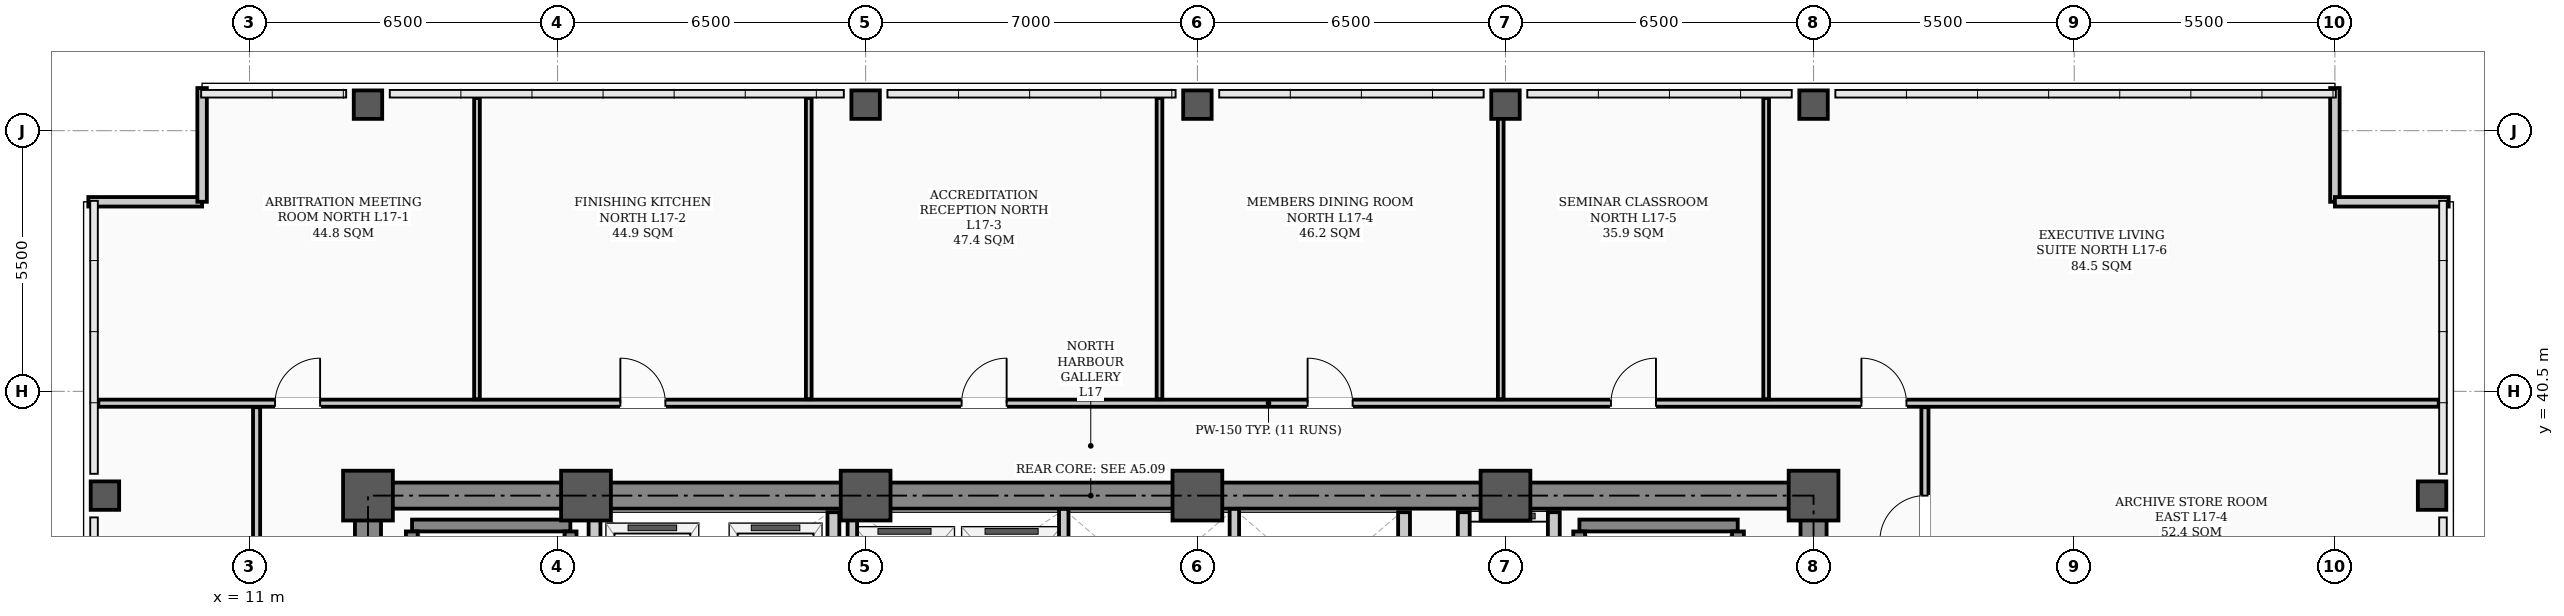
"""IFC4 building model, lengths in metres.
Left out: names, types, materials, properties, quantities, classifications, styles, units other than length and angle.
Written with IfcOpenShell. Run it as: python <this file> out.ifc"""

import sys

from ifc_helpers import new_model, si_unit, direction, frame, frame_2d, origin, origin_2d, place, context, subcontext, project, spatial, rectangle, hollow_rectangle, extrude, element, fill, save


model = new_model("IFC4")
c1 = context("Model", 3, precision=1e-05, world=origin(), true_north=direction((0.0, 1.0)))
c2 = subcontext(c1, "Body", "Model", "MODEL_VIEW")
j1 = project(units=[si_unit("LENGTHUNIT", "METRE"), si_unit("PLANEANGLEUNIT", "RADIAN")], contexts=[c1])
p1 = place(None, origin())
s1 = spatial("IfcSite", under=j1, at=p1, CompositionType="ELEMENT")
p2 = place(p1, origin())
s2 = spatial("IfcBuilding", under=s1, at=p2, CompositionType="ELEMENT")
p3 = place(p2, frame((0.0, 0.0, 69.4)))
s3 = spatial("IfcBuildingStorey", under=s2, at=p3, CompositionType="ELEMENT", Elevation=69.4)
for number, where, z_axis, x_axis in (
    (1, (13.5, 38.3, 0.0), (0.0, 0.0, 1.0), (1.0, 0.0, 0.0)),
    (2, (18.1, 38.3, 0.0), (0.0, 0.0, 1.0), (1.0, 0.0, 0.0)),
    (3, (24.0, 38.3, 0.0), (0.0, 0.0, 1.0), (1.0, 0.0, 0.0)),
    (4, (31.0, 38.3, 0.0), (0.0, 0.0, 1.0), (1.0, 0.0, 0.0)),
    (5, (37.5, 38.3, 0.0), (0.0, 0.0, 1.0), (1.0, 0.0, 0.0)),
    (6, (44.0, 38.3, 0.0), (0.0, 0.0, 1.0), (1.0, 0.0, 0.0)),
):
    element("IfcColumn", number, at=place(p3, frame(where, z_axis=z_axis, x_axis=x_axis)), inside=s3, PredefinedType="COLUMN", context=c2, shape_type="SweptSolid", body=[
        extrude(hollow_rectangle(XDim=1.05, YDim=1.05, WallThickness=0.038, InnerFilletRadius=0.019, OuterFilletRadius=0.057, at=origin_2d()), origin(), (0.0, 0.0, 1.0), 3.9),
    ])
for number, where, z_axis, x_axis in (
    (7, (7.95, 38.3, 0.0), (0.0, 0.0, 1.0), (1.0, 0.0, 0.0)),
    (8, (13.5, 46.55, 0.0), (0.0, 0.0, 1.0), (1.0, 0.0, 0.0)),
    (9, (24.0, 46.55, 0.0), (0.0, 0.0, 1.0), (1.0, 0.0, 0.0)),
    (10, (31.0, 46.55, 0.0), (0.0, 0.0, 1.0), (1.0, 0.0, 0.0)),
    (11, (37.5, 46.55, 0.0), (0.0, 0.0, 1.0), (1.0, 0.0, 0.0)),
    (12, (44.0, 46.55, 0.0), (0.0, 0.0, 1.0), (1.0, 0.0, 0.0)),
    (13, (57.05, 38.3, 0.0), (0.0, 0.0, 1.0), (1.0, 0.0, 0.0)),
):
    element("IfcColumn", number, at=place(p3, frame(where, z_axis=z_axis, x_axis=x_axis)), inside=s3, PredefinedType="COLUMN", context=c2, shape_type="SweptSolid", body=[
        extrude(hollow_rectangle(XDim=0.6, YDim=0.6, WallThickness=0.026, InnerFilletRadius=0.013, OuterFilletRadius=0.039, at=origin_2d()), origin(), (0.0, 0.0, 1.0), 3.9),
    ])
for number, where, z_axis, x_axis in (
    (14, (7.6, 44.5, 0.0), (0.0, 0.0, 1.0), (1.0, 0.0, 0.0)),
    (15, (10.0, 44.5, 0.0), (0.0, 0.0, 1.0), (0.0, 1.0, 0.0)),
    (16, (55.0, 46.9, 0.0), (0.0, 0.0, 1.0), (0.0, -1.0, 0.0)),
    (17, (55.0, 44.5, 0.0), (0.0, 0.0, 1.0), (1.0, 0.0, 0.0)),
):
    element("IfcWall", number, at=place(p3, frame(where, z_axis=z_axis, x_axis=x_axis)), inside=s3, PredefinedType="PARAPET", context=c2, shape_type="SweptSolid", body=[
        extrude(rectangle(XDim=2.4, YDim=0.2, at=frame_2d((1.2, 0.0))), origin(), (0.0, 0.0, 1.0), 1.2),
    ])
p4 = place(p3, frame((13.5, 38.3, 0.0), z_axis=(0.0, 0.0, 1.0), x_axis=(1.0, 0.0, 0.0)))
e18 = element("IfcWall", 18, at=p4, inside=s3, PredefinedType="SHEAR", context=c2, shape_type="SweptSolid", body=[
    extrude(rectangle(XDim=30.5, YDim=0.55, at=frame_2d((15.25, 0.0))), origin(), (0.0, 0.0, 1.0), 3.72),
])
for number, where, z_axis, x_axis in (
    (19, (13.5, 29.35, 0.0), (0.0, 0.0, 1.0), (0.0, 1.0, 0.0)),
    (20, (44.0, 29.35, 0.0), (0.0, 0.0, 1.0), (0.0, 1.0, 0.0)),
):
    element("IfcWall", number, at=place(p3, frame(where, z_axis=z_axis, x_axis=x_axis)), inside=s3, PredefinedType="SHEAR", context=c2, shape_type="SweptSolid", body=[
        extrude(rectangle(XDim=8.6, YDim=0.55, at=frame_2d((4.3, 0.0))), origin(), (0.0, 0.0, 1.0), 3.72),
    ])
p5 = place(p3, frame((14.43, 37.669, 0.0), z_axis=(0.0, 0.0, 1.0), x_axis=(1.0, 0.0, 0.0)))
e21 = element("IfcWall", 21, at=p5, inside=s3, PredefinedType="STANDARD", context=c2, shape_type="SweptSolid", body=[
    extrude(rectangle(XDim=3.34, YDim=0.25, at=frame_2d((1.67, 0.0))), origin(), (0.0, 0.0, 1.0), 3.72),
])
for number, where, z_axis, x_axis in (
    (22, (14.425, 30.36, 0.0), (0.0, 0.0, 1.0), (0.0, 1.0, 0.0)),
    (23, (17.775, 30.36, 0.0), (0.0, 0.0, 1.0), (0.0, 1.0, 0.0)),
):
    element("IfcWall", number, at=place(p3, frame(where, z_axis=z_axis, x_axis=x_axis)), inside=s3, PredefinedType="STANDARD", context=c2, shape_type="SweptSolid", body=[
        extrude(rectangle(XDim=7.184, YDim=0.25, at=frame_2d((3.592, 0.0))), origin(), (0.0, 0.0, 1.0), 3.72),
    ])
p6 = place(p3, frame((39.06, 37.669, 0.0), z_axis=(0.0, 0.0, 1.0), x_axis=(1.0, 0.0, 0.0)))
e24 = element("IfcWall", 24, at=p6, inside=s3, PredefinedType="STANDARD", context=c2, shape_type="SweptSolid", body=[
    extrude(rectangle(XDim=3.34, YDim=0.25, at=frame_2d((1.67, 0.0))), origin(), (0.0, 0.0, 1.0), 3.72),
])
for number, where, z_axis, x_axis in (
    (25, (39.055, 30.36, 0.0), (0.0, 0.0, 1.0), (0.0, 1.0, 0.0)),
    (26, (42.405, 30.36, 0.0), (0.0, 0.0, 1.0), (0.0, 1.0, 0.0)),
):
    element("IfcWall", number, at=place(p3, frame(where, z_axis=z_axis, x_axis=x_axis)), inside=s3, PredefinedType="STANDARD", context=c2, shape_type="SweptSolid", body=[
        extrude(rectangle(XDim=7.184, YDim=0.25, at=frame_2d((3.592, 0.0))), origin(), (0.0, 0.0, 1.0), 3.72),
    ])
p7 = place(p3, frame((36.62, 31.95, 0.0), z_axis=(0.0, 0.0, 1.0), x_axis=(0.0, 1.0, 0.0)))
e27 = element("IfcWall", 27, at=p7, inside=s3, PredefinedType="STANDARD", context=c2, shape_type="SweptSolid", body=[
    extrude(rectangle(XDim=6.0, YDim=0.25, at=frame_2d((3.0, 0.0))), origin(), (0.0, 0.0, 1.0), 3.3),
])
p8 = place(p7, frame((0.9, 0.0, 0.0)))
e28 = element("IfcOpeningElement", 28, at=p8, cuts=e27, PredefinedType="OPENING", context=c2, shape_type="SweptSolid", body=[
    extrude(rectangle(XDim=1.1, YDim=2.08, at=frame_2d((0.55, 1.04))), frame((0.0, 0.135, 0.0), z_axis=(0.0, -1.0, 0.0), x_axis=(1.0, 0.0, 0.0)), (0.0, 0.0, 1.0), 0.27),
])
p9 = place(p7, frame((4.0, 0.0, 0.0)))
e29 = element("IfcOpeningElement", 29, at=p9, cuts=e27, PredefinedType="OPENING", context=c2, shape_type="SweptSolid", body=[
    extrude(rectangle(XDim=1.1, YDim=2.08, at=frame_2d((0.55, 1.04))), frame((0.0, 0.135, 0.0), z_axis=(0.0, -1.0, 0.0), x_axis=(1.0, 0.0, 0.0)), (0.0, 0.0, 1.0), 0.27),
])
p10 = place(p3, frame((38.52, 31.95, 0.0), z_axis=(0.0, 0.0, 1.0), x_axis=(0.0, 1.0, 0.0)))
e30 = element("IfcWall", 30, at=p10, inside=s3, PredefinedType="STANDARD", context=c2, shape_type="SweptSolid", body=[
    extrude(rectangle(XDim=6.0, YDim=0.25, at=frame_2d((3.0, 0.0))), origin(), (0.0, 0.0, 1.0), 3.3),
])
for number, where, z_axis, x_axis in (
    (31, (18.28, 34.62, 0.0), (0.0, 0.0, 1.0), (0.0, 1.0, 0.0)),
    (32, (23.32, 34.62, 0.0), (0.0, 0.0, 1.0), (0.0, 1.0, 0.0)),
):
    element("IfcWall", number, at=place(p3, frame(where, z_axis=z_axis, x_axis=x_axis)), inside=s3, PredefinedType="STANDARD", context=c2, shape_type="SweptSolid", body=[
        extrude(rectangle(XDim=3.33, YDim=0.25, at=frame_2d((1.665, 0.0))), origin(), (0.0, 0.0, 1.0), 3.3),
    ])
p11 = place(p3, frame((35.36, 34.9, 0.0), z_axis=(0.0, 0.0, 1.0), x_axis=(0.0, 1.0, 0.0)))
e33 = element("IfcWall", 33, at=p11, inside=s3, PredefinedType="STANDARD", context=c2, shape_type="SweptSolid", body=[
    extrude(rectangle(XDim=3.05, YDim=0.25, at=frame_2d((1.525, 0.0))), origin(), (0.0, 0.0, 1.0), 3.3),
])
p12 = place(p3, frame((7.81, 40.25, 0.0), z_axis=(0.0, 0.0, 1.0), x_axis=(1.0, 0.0, 0.0)))
e34 = element("IfcWall", 34, at=p12, inside=s3, PredefinedType="PARTITIONING", context=c2, shape_type="SweptSolid", body=[
    extrude(rectangle(XDim=49.38, YDim=0.15, at=frame_2d((24.69, 0.0))), origin(), (0.0, 0.0, 1.0), 3.1),
])
p13 = place(p12, frame((3.73, 0.0, 0.0)))
e35 = element("IfcOpeningElement", 35, at=p13, cuts=e34, PredefinedType="OPENING", context=c2, shape_type="SweptSolid", body=[
    extrude(rectangle(XDim=0.95, YDim=2.08, at=frame_2d((0.475, 1.04))), frame((0.0, 0.085, 0.0), z_axis=(0.0, -1.0, 0.0), x_axis=(1.0, 0.0, 0.0)), (0.0, 0.0, 1.0), 0.17),
])
p14 = place(p12, frame((11.015, 0.0, 0.0)))
e36 = element("IfcOpeningElement", 36, at=p14, cuts=e34, PredefinedType="OPENING", context=c2, shape_type="SweptSolid", body=[
    extrude(rectangle(XDim=0.95, YDim=2.08, at=frame_2d((0.475, 1.04))), frame((0.0, 0.085, 0.0), z_axis=(0.0, -1.0, 0.0), x_axis=(1.0, 0.0, 0.0)), (0.0, 0.0, 1.0), 0.17),
])
p15 = place(p12, frame((18.215, 0.0, 0.0)))
e37 = element("IfcOpeningElement", 37, at=p15, cuts=e34, PredefinedType="OPENING", context=c2, shape_type="SweptSolid", body=[
    extrude(rectangle(XDim=0.95, YDim=2.08, at=frame_2d((0.475, 1.04))), frame((0.0, 0.085, 0.0), z_axis=(0.0, -1.0, 0.0), x_axis=(1.0, 0.0, 0.0)), (0.0, 0.0, 1.0), 0.17),
])
p16 = place(p12, frame((25.515, 0.0, 0.0)))
e38 = element("IfcOpeningElement", 38, at=p16, cuts=e34, PredefinedType="OPENING", context=c2, shape_type="SweptSolid", body=[
    extrude(rectangle(XDim=0.95, YDim=2.08, at=frame_2d((0.475, 1.04))), frame((0.0, 0.085, 0.0), z_axis=(0.0, -1.0, 0.0), x_axis=(1.0, 0.0, 0.0)), (0.0, 0.0, 1.0), 0.17),
])
p17 = place(p12, frame((31.915, 0.0, 0.0)))
e39 = element("IfcOpeningElement", 39, at=p17, cuts=e34, PredefinedType="OPENING", context=c2, shape_type="SweptSolid", body=[
    extrude(rectangle(XDim=0.95, YDim=2.08, at=frame_2d((0.475, 1.04))), frame((0.0, 0.085, 0.0), z_axis=(0.0, -1.0, 0.0), x_axis=(1.0, 0.0, 0.0)), (0.0, 0.0, 1.0), 0.17),
])
p18 = place(p12, frame((37.2, 0.0, 0.0)))
e40 = element("IfcOpeningElement", 40, at=p18, cuts=e34, PredefinedType="OPENING", context=c2, shape_type="SweptSolid", body=[
    extrude(rectangle(XDim=0.95, YDim=2.08, at=frame_2d((0.475, 1.04))), frame((0.0, 0.085, 0.0), z_axis=(0.0, -1.0, 0.0), x_axis=(1.0, 0.0, 0.0)), (0.0, 0.0, 1.0), 0.17),
])
p19 = place(p3, frame((11.15, 17.635, 0.0), z_axis=(0.0, 0.0, 1.0), x_axis=(0.0, 1.0, 0.0)))
e41 = element("IfcWall", 41, at=p19, inside=s3, PredefinedType="PARTITIONING", context=c2, shape_type="SweptSolid", body=[
    extrude(rectangle(XDim=22.53, YDim=0.15, at=frame_2d((11.265, 0.0))), origin(), (0.0, 0.0, 1.0), 3.0),
])
p20 = place(p19, frame((0.64, 0.0, 0.0)))
e42 = element("IfcOpeningElement", 42, at=p20, cuts=e41, PredefinedType="OPENING", context=c2, shape_type="SweptSolid", body=[
    extrude(rectangle(XDim=0.95, YDim=2.08, at=frame_2d((0.475, 1.04))), frame((0.0, 0.085, 0.0), z_axis=(0.0, -1.0, 0.0), x_axis=(1.0, 0.0, 0.0)), (0.0, 0.0, 1.0), 0.17),
])
p21 = place(p3, frame((46.35, 17.635, 0.0), z_axis=(0.0, 0.0, 1.0), x_axis=(0.0, 1.0, 0.0)))
e43 = element("IfcWall", 43, at=p21, inside=s3, PredefinedType="PARTITIONING", context=c2, shape_type="SweptSolid", body=[
    extrude(rectangle(XDim=22.53, YDim=0.15, at=frame_2d((11.265, 0.0))), origin(), (0.0, 0.0, 1.0), 3.0),
])
p22 = place(p21, frame((3.065, 0.0, 0.0)))
e44 = element("IfcOpeningElement", 44, at=p22, cuts=e43, PredefinedType="OPENING", context=c2, shape_type="SweptSolid", body=[
    extrude(rectangle(XDim=0.95, YDim=2.08, at=frame_2d((0.475, 1.04))), frame((0.0, 0.085, 0.0), z_axis=(0.0, -1.0, 0.0), x_axis=(1.0, 0.0, 0.0)), (0.0, 0.0, 1.0), 0.17),
])
p23 = place(p21, frame((9.39, 0.0, 0.0)))
e45 = element("IfcOpeningElement", 45, at=p23, cuts=e43, PredefinedType="OPENING", context=c2, shape_type="SweptSolid", body=[
    extrude(rectangle(XDim=0.95, YDim=2.08, at=frame_2d((0.475, 1.04))), frame((0.0, 0.085, 0.0), z_axis=(0.0, -1.0, 0.0), x_axis=(1.0, 0.0, 0.0)), (0.0, 0.0, 1.0), 0.17),
])
p24 = place(p21, frame((14.69, 0.0, 0.0)))
e46 = element("IfcOpeningElement", 46, at=p24, cuts=e43, PredefinedType="OPENING", context=c2, shape_type="SweptSolid", body=[
    extrude(rectangle(XDim=0.95, YDim=2.08, at=frame_2d((0.475, 1.04))), frame((0.0, 0.085, 0.0), z_axis=(0.0, -1.0, 0.0), x_axis=(1.0, 0.0, 0.0)), (0.0, 0.0, 1.0), 0.17),
])
p25 = place(p21, frame((19.715, 0.0, 0.0)))
e47 = element("IfcOpeningElement", 47, at=p25, cuts=e43, PredefinedType="OPENING", context=c2, shape_type="SweptSolid", body=[
    extrude(rectangle(XDim=0.95, YDim=2.08, at=frame_2d((0.475, 1.04))), frame((0.0, 0.085, 0.0), z_axis=(0.0, -1.0, 0.0), x_axis=(1.0, 0.0, 0.0)), (0.0, 0.0, 1.0), 0.17),
])
for number, where, z_axis, x_axis in (
    (48, (15.8, 40.335, 0.0), (0.0, 0.0, 1.0), (0.0, 1.0, 0.0)),
    (49, (22.8, 40.335, 0.0), (0.0, 0.0, 1.0), (0.0, 1.0, 0.0)),
    (50, (30.2, 40.335, 0.0), (0.0, 0.0, 1.0), (0.0, 1.0, 0.0)),
):
    element("IfcWall", number, at=place(p3, frame(where, z_axis=z_axis, x_axis=x_axis)), inside=s3, PredefinedType="PARTITIONING", context=c2, shape_type="SweptSolid", body=[
        extrude(rectangle(XDim=6.355, YDim=0.12, at=frame_2d((3.177, 0.0))), origin(), (0.0, 0.0, 1.0), 3.212),
    ])
p26 = place(p3, frame((37.4, 40.335, 0.0), z_axis=(0.0, 0.0, 1.0), x_axis=(0.0, 1.0, 0.0)))
e51 = element("IfcWall", 51, at=p26, inside=s3, PredefinedType="PARTITIONING", context=c2, shape_type="SweptSolid", body=[
    extrude(rectangle(XDim=6.355, YDim=0.12, at=frame_2d((3.177, 0.0))), origin(), (0.0, 0.0, 1.0), 3.1),
])
p27 = place(p3, frame((43.0, 40.335, 0.0), z_axis=(0.0, 0.0, 1.0), x_axis=(0.0, 1.0, 0.0)))
e52 = element("IfcWall", 52, at=p27, inside=s3, PredefinedType="PARTITIONING", context=c2, shape_type="SweptSolid", body=[
    extrude(rectangle(XDim=6.355, YDim=0.12, at=frame_2d((3.177, 0.0))), origin(), (0.0, 0.0, 1.0), 3.212),
])
p28 = place(p3, frame((23.72, 34.9, 0.0), z_axis=(0.0, 0.0, 1.0), x_axis=(0.0, 1.0, 0.0)))
e53 = element("IfcWall", 53, at=p28, inside=s3, PredefinedType="STANDARD", context=c2, shape_type="SweptSolid", body=[
    extrude(rectangle(XDim=3.12, YDim=0.2, at=frame_2d((1.56, 0.0))), origin(), (0.0, 0.0, 1.0), 3.1),
])
for number, where, z_axis, x_axis in (
    (54, (28.18, 34.9, 0.0), (0.0, 0.0, 1.0), (0.0, 1.0, 0.0)),
    (55, (31.78, 34.9, 0.0), (0.0, 0.0, 1.0), (0.0, 1.0, 0.0)),
):
    element("IfcWall", number, at=place(p3, frame(where, z_axis=z_axis, x_axis=x_axis)), inside=s3, PredefinedType="STANDARD", context=c2, shape_type="SweptSolid", body=[
        extrude(rectangle(XDim=3.12, YDim=0.2, at=frame_2d((1.56, 0.0))), origin(), (0.0, 0.0, 1.0), 3.3),
    ])
p29 = place(p25, origin())
e56 = element("IfcDoor", 56, at=p29, inside=s3, OperationType="SINGLE_SWING_LEFT", PredefinedType="DOOR", context=c2, shape_type="SweptSolid", body=[
    extrude(rectangle(XDim=0.95, YDim=2.08, at=frame_2d((0.475, 1.04))), frame((0.0, 0.025, 0.0), z_axis=(0.0, -1.0, 0.0), x_axis=(1.0, 0.0, 0.0)), (0.0, 0.0, 1.0), 0.05),
])
fill(e47, e56)
p30 = place(p13, origin())
e57 = element("IfcDoor", 57, at=p30, inside=s3, OperationType="SINGLE_SWING_RIGHT", PredefinedType="DOOR", context=c2, shape_type="SweptSolid", body=[
    extrude(rectangle(XDim=0.95, YDim=2.08, at=frame_2d((0.475, 1.04))), frame((0.0, 0.025, 0.0), z_axis=(0.0, -1.0, 0.0), x_axis=(1.0, 0.0, 0.0)), (0.0, 0.0, 1.0), 0.05),
])
fill(e35, e57)
p31 = place(p14, origin())
e58 = element("IfcDoor", 58, at=p31, inside=s3, OperationType="SINGLE_SWING_LEFT", PredefinedType="DOOR", context=c2, shape_type="SweptSolid", body=[
    extrude(rectangle(XDim=0.95, YDim=2.08, at=frame_2d((0.475, 1.04))), frame((0.0, 0.025, 0.0), z_axis=(0.0, -1.0, 0.0), x_axis=(1.0, 0.0, 0.0)), (0.0, 0.0, 1.0), 0.05),
])
fill(e36, e58)
p32 = place(p15, origin())
e59 = element("IfcDoor", 59, at=p32, inside=s3, OperationType="SINGLE_SWING_RIGHT", PredefinedType="DOOR", context=c2, shape_type="SweptSolid", body=[
    extrude(rectangle(XDim=0.95, YDim=2.08, at=frame_2d((0.475, 1.04))), frame((0.0, 0.025, 0.0), z_axis=(0.0, -1.0, 0.0), x_axis=(1.0, 0.0, 0.0)), (0.0, 0.0, 1.0), 0.05),
])
fill(e37, e59)
p33 = place(p16, origin())
e60 = element("IfcDoor", 60, at=p33, inside=s3, OperationType="SINGLE_SWING_LEFT", PredefinedType="DOOR", context=c2, shape_type="SweptSolid", body=[
    extrude(rectangle(XDim=0.95, YDim=2.08, at=frame_2d((0.475, 1.04))), frame((0.0, 0.025, 0.0), z_axis=(0.0, -1.0, 0.0), x_axis=(1.0, 0.0, 0.0)), (0.0, 0.0, 1.0), 0.05),
])
fill(e38, e60)
p34 = place(p17, origin())
e61 = element("IfcDoor", 61, at=p34, inside=s3, OperationType="SINGLE_SWING_RIGHT", PredefinedType="DOOR", context=c2, shape_type="SweptSolid", body=[
    extrude(rectangle(XDim=0.95, YDim=2.08, at=frame_2d((0.475, 1.04))), frame((0.0, 0.025, 0.0), z_axis=(0.0, -1.0, 0.0), x_axis=(1.0, 0.0, 0.0)), (0.0, 0.0, 1.0), 0.05),
])
fill(e39, e61)
p35 = place(p18, origin())
e62 = element("IfcDoor", 62, at=p35, inside=s3, OperationType="SINGLE_SWING_LEFT", PredefinedType="DOOR", context=c2, shape_type="SweptSolid", body=[
    extrude(rectangle(XDim=0.95, YDim=2.08, at=frame_2d((0.475, 1.04))), frame((0.0, 0.025, 0.0), z_axis=(0.0, -1.0, 0.0), x_axis=(1.0, 0.0, 0.0)), (0.0, 0.0, 1.0), 0.05),
])
fill(e40, e62)
save(model, sys.argv[1])
